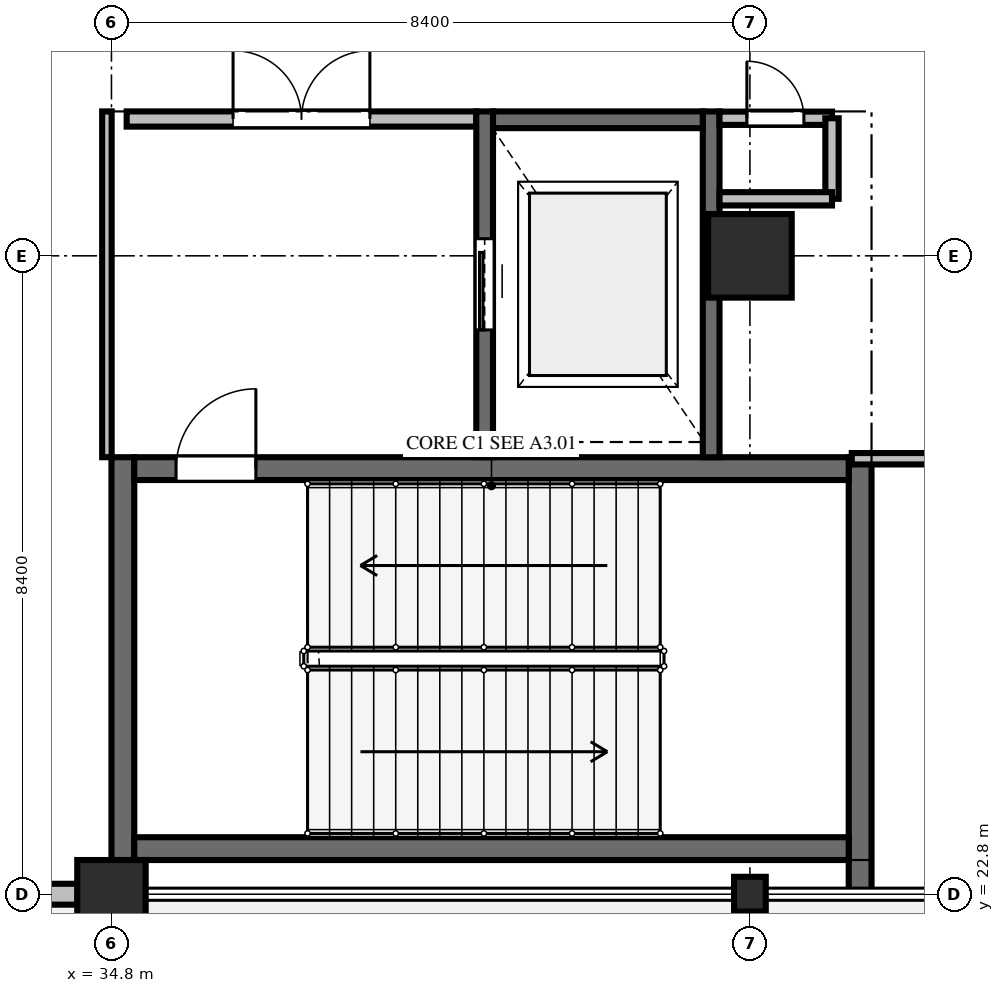
"""IFC4 building model, lengths in metres.
Left out: names, types, materials, properties, quantities, classifications, styles, units other than length and angle.
Written with IfcOpenShell. Run it as: python <this file> out.ifc"""

import sys

from ifc_helpers import new_model, si_unit, direction, frame, frame_2d, origin, origin_2d, place, context, subcontext, project, spatial, rectangle, hollow_rectangle, i_section, extrude, element, fill, save


model = new_model("IFC4")
c1 = context("Model", 3, precision=1e-05, world=origin(), true_north=direction((0.0, 1.0)))
c2 = subcontext(c1, "Body", "Model", "MODEL_VIEW")
j1 = project(units=[si_unit("LENGTHUNIT", "METRE"), si_unit("PLANEANGLEUNIT", "RADIAN")], contexts=[c1])
p1 = place(None, origin())
s1 = spatial("IfcSite", under=j1, at=p1, CompositionType="ELEMENT")
p2 = place(p1, origin())
s2 = spatial("IfcBuilding", under=s1, at=p2, CompositionType="ELEMENT")
p3 = place(p2, frame((0.0, 0.0, 10.8)))
s3 = spatial("IfcBuildingStorey", under=s2, at=p3, CompositionType="ELEMENT", Elevation=10.8)
p4 = place(p3, frame((34.8, 22.8, 0.0), z_axis=(0.0, 0.0, 1.0), x_axis=(1.0, 0.0, 0.0)))
e1 = element("IfcColumn", 1, at=p4, inside=s3, PredefinedType="COLUMN", context=c2, shape_type="SweptSolid", body=[
    extrude(hollow_rectangle(XDim=0.9, YDim=0.9, WallThickness=0.036, InnerFilletRadius=0.036, OuterFilletRadius=0.072, at=origin_2d()), origin(), (0.0, 0.0, 1.0), 6.0),
])
p5 = place(p3, frame((43.2, 22.8, 0.0), z_axis=(0.0, 0.0, 1.0), x_axis=(1.0, 0.0, 0.0)))
e2 = element("IfcColumn", 2, at=p5, inside=s3, PredefinedType="COLUMN", context=c2, shape_type="SweptSolid", body=[
    extrude(i_section(OverallWidth=0.417, OverallDepth=0.458, WebThickness=0.03, FlangeThickness=0.04, FilletRadius=0.022, at=origin_2d()), origin(), (0.0, 0.0, 1.0), 6.0),
])
p6 = place(p3, frame((43.2, 31.2, 0.0), z_axis=(0.0, 0.0, 1.0), x_axis=(1.0, 0.0, 0.0)))
e3 = element("IfcColumn", 3, at=p6, inside=s3, PredefinedType="COLUMN", context=c2, shape_type="SweptSolid", body=[
    extrude(rectangle(XDim=1.1, YDim=1.1, at=origin_2d()), origin(), (0.0, 0.0, 1.0), 6.0),
])
p7 = place(p3, frame((34.354, 22.8, 0.0), z_axis=(0.0, 0.0, 1.0), x_axis=(-1.0, 0.0, 0.0)))
e4 = element("IfcWall", 4, at=p7, inside=s3, PredefinedType="SOLIDWALL", context=c2, shape_type="SweptSolid", body=[
    extrude(rectangle(XDim=6.686, YDim=0.275, at=frame_2d((3.343, 0.0))), origin(), (0.0, 0.0, 1.0), 5.66),
])
p8 = place(p7, frame((2.543, 0.0, 0.0)))
e5 = element("IfcOpeningElement", 5, at=p8, cuts=e4, PredefinedType="OPENING", context=c2, shape_type="SweptSolid", body=[
    extrude(rectangle(XDim=1.6, YDim=2.2, at=frame_2d((0.8, 1.1))), frame((0.0, 0.147, 0.0), z_axis=(0.0, -1.0, 0.0), x_axis=(1.0, 0.0, 0.0)), (0.0, 0.0, 1.0), 0.295),
])
p9 = place(p3, frame((34.95, 23.25, 0.0), z_axis=(0.0, 0.0, 1.0), x_axis=(0.0, 1.0, 0.0)))
e6 = element("IfcWall", 6, at=p9, inside=s3, PredefinedType="SHEAR", context=c2, shape_type="SweptSolid", body=[
    extrude(rectangle(XDim=5.3, YDim=0.3, at=frame_2d((2.65, 0.0))), origin(), (0.0, 0.0, 1.0), 5.68),
])
p10 = place(p3, frame((44.65, 28.55, 0.0), z_axis=(0.0, 0.0, 1.0), x_axis=(0.0, -1.0, 0.0)))
e7 = element("IfcWall", 7, at=p10, inside=s3, PredefinedType="SHEAR", context=c2, shape_type="SweptSolid", body=[
    extrude(rectangle(XDim=5.75, YDim=0.3, at=frame_2d((2.875, 0.0))), origin(), (0.0, 0.0, 1.0), 5.68),
])
p11 = place(p3, frame((44.5, 23.4, 0.0), z_axis=(0.0, 0.0, 1.0), x_axis=(-1.0, 0.0, 0.0)))
e8 = element("IfcWall", 8, at=p11, inside=s3, PredefinedType="SHEAR", context=c2, shape_type="SweptSolid", body=[
    extrude(rectangle(XDim=9.4, YDim=0.3, at=frame_2d((4.7, 0.0))), origin(), (0.0, 0.0, 1.0), 5.68),
])
p12 = place(p3, frame((35.1, 28.4, 0.0), z_axis=(0.0, 0.0, 1.0), x_axis=(1.0, 0.0, 0.0)))
e9 = element("IfcWall", 9, at=p12, inside=s3, PredefinedType="SHEAR", context=c2, shape_type="SweptSolid", body=[
    extrude(rectangle(XDim=9.4, YDim=0.3, at=frame_2d((4.7, 0.0))), origin(), (0.0, 0.0, 1.0), 5.68),
])
p13 = place(p12, frame((0.55, 0.0, 0.0)))
e10 = element("IfcOpeningElement", 10, at=p13, cuts=e9, PredefinedType="OPENING", context=c2, shape_type="SweptSolid", body=[
    extrude(rectangle(XDim=1.05, YDim=2.2, at=frame_2d((0.525, 1.1))), frame((0.0, 0.16, 0.0), z_axis=(0.0, -1.0, 0.0), x_axis=(1.0, 0.0, 0.0)), (0.0, 0.0, 1.0), 0.32),
])
p14 = place(p3, frame((35.0, 33.0, 0.0), z_axis=(0.0, 0.0, 1.0), x_axis=(1.0, 0.0, 0.0)))
e11 = element("IfcWall", 11, at=p14, inside=s3, PredefinedType="SOLIDWALL", context=c2, shape_type="SweptSolid", body=[
    extrude(rectangle(XDim=4.6, YDim=0.2, at=frame_2d((2.3, 0.0))), origin(), (0.0, 0.0, 1.0), 5.65),
])
p15 = place(p14, frame((1.4, 0.0, 0.0)))
e12 = element("IfcOpeningElement", 12, at=p15, cuts=e11, PredefinedType="OPENING", context=c2, shape_type="SweptSolid", body=[
    extrude(rectangle(XDim=1.8, YDim=2.2, at=frame_2d((0.9, 1.1))), frame((0.0, 0.11, 0.0), z_axis=(0.0, -1.0, 0.0), x_axis=(1.0, 0.0, 0.0)), (0.0, 0.0, 1.0), 0.22),
])
p16 = place(p3, frame((39.71, 28.55, 0.0), z_axis=(0.0, 0.0, 1.0), x_axis=(0.0, 1.0, 0.0)))
e13 = element("IfcWall", 13, at=p16, inside=s3, PredefinedType="SOLIDWALL", context=c2, shape_type="SweptSolid", body=[
    extrude(rectangle(XDim=4.55, YDim=0.22, at=frame_2d((2.275, 0.0))), origin(), (0.0, 0.0, 1.0), 5.68),
])
p17 = place(p16, frame((1.675, 0.0, 0.0)))
e14 = element("IfcOpeningElement", 14, at=p17, cuts=e13, PredefinedType="OPENING", context=c2, shape_type="SweptSolid", body=[
    extrude(rectangle(XDim=1.2, YDim=2.2, at=frame_2d((0.6, 1.1))), frame((0.0, 0.12, 0.0), z_axis=(0.0, -1.0, 0.0), x_axis=(1.0, 0.0, 0.0)), (0.0, 0.0, 1.0), 0.24),
])
p18 = place(p3, frame((42.69, 28.55, 0.0), z_axis=(0.0, 0.0, 1.0), x_axis=(0.0, 1.0, 0.0)))
e15 = element("IfcWall", 15, at=p18, inside=s3, PredefinedType="SOLIDWALL", context=c2, shape_type="SweptSolid", body=[
    extrude(rectangle(XDim=4.55, YDim=0.22, at=frame_2d((2.275, 0.0))), origin(), (0.0, 0.0, 1.0), 5.68),
])
p19 = place(p3, frame((39.82, 32.99, 0.0), z_axis=(0.0, 0.0, 1.0), x_axis=(1.0, 0.0, 0.0)))
e16 = element("IfcWall", 16, at=p19, inside=s3, PredefinedType="SOLIDWALL", context=c2, shape_type="SweptSolid", body=[
    extrude(rectangle(XDim=2.76, YDim=0.22, at=frame_2d((1.38, 0.0))), origin(), (0.0, 0.0, 1.0), 5.68),
])
p20 = place(p3, frame((42.8, 33.01, 0.0), z_axis=(0.0, 0.0, 1.0), x_axis=(1.0, 0.0, 0.0)))
e17 = element("IfcWall", 17, at=p20, inside=s3, PredefinedType="PLUMBINGWALL", context=c2, shape_type="SweptSolid", body=[
    extrude(rectangle(XDim=1.48, YDim=0.175, at=frame_2d((0.74, 0.0))), origin(), (0.0, 0.0, 1.0), 5.65),
])
p21 = place(p20, frame((0.36, 0.0, 0.0)))
e18 = element("IfcOpeningElement", 18, at=p21, cuts=e17, PredefinedType="OPENING", context=c2, shape_type="SweptSolid", body=[
    extrude(rectangle(XDim=0.75, YDim=2.05, at=frame_2d((0.375, 1.025))), frame((0.0, 0.097, 0.0), z_axis=(0.0, -1.0, 0.0), x_axis=(1.0, 0.0, 0.0)), (0.0, 0.0, 1.0), 0.195),
])
p22 = place(p3, frame((44.28, 31.95, 0.0), z_axis=(0.0, 0.0, 1.0), x_axis=(0.0, 1.0, 0.0)))
e19 = element("IfcWall", 19, at=p22, inside=s3, PredefinedType="PLUMBINGWALL", context=c2, shape_type="SweptSolid", body=[
    extrude(rectangle(XDim=1.06, YDim=0.175, at=frame_2d((0.53, 0.0))), origin(), (0.0, 0.0, 1.0), 5.65),
])
p23 = place(p3, frame((42.8, 31.95, 0.0), z_axis=(0.0, 0.0, 1.0), x_axis=(1.0, 0.0, 0.0)))
e20 = element("IfcWall", 20, at=p23, inside=s3, PredefinedType="PLUMBINGWALL", context=c2, shape_type="SweptSolid", body=[
    extrude(rectangle(XDim=1.48, YDim=0.175, at=frame_2d((0.74, 0.0))), origin(), (0.0, 0.0, 1.0), 5.65),
])
p24 = place(p3, frame((44.54, 28.53, 0.0), z_axis=(0.0, 0.0, 1.0), x_axis=(1.0, 0.0, 0.0)))
e21 = element("IfcWall", 21, at=p24, inside=s3, PredefinedType="PARTITIONING", context=c2, shape_type="SweptSolid", body=[
    extrude(rectangle(XDim=15.46, YDim=0.15, at=frame_2d((7.73, 0.0))), origin(), (0.0, 0.0, 1.0), 4.858),
])
p25 = place(p24, frame((7.27, 0.0, 0.0)))
e22 = element("IfcOpeningElement", 22, at=p25, cuts=e21, PredefinedType="OPENING", context=c2, shape_type="SweptSolid", body=[
    extrude(rectangle(XDim=0.92, YDim=2.15, at=frame_2d((0.46, 1.075))), frame((0.0, 0.085, 0.0), z_axis=(0.0, -1.0, 0.0), x_axis=(1.0, 0.0, 0.0)), (0.0, 0.0, 1.0), 0.17),
])
p26 = place(p3, frame((34.74, 33.1, 0.0), z_axis=(0.0, 0.0, 1.0), x_axis=(0.0, -1.0, 0.0)))
e23 = element("IfcWall", 23, at=p26, inside=s3, PredefinedType="PARTITIONING", context=c2, shape_type="SweptSolid", body=[
    extrude(rectangle(XDim=4.55, YDim=0.125, at=frame_2d((2.275, 0.0))), origin(), (0.0, 0.0, 1.0), 5.65),
])
p27 = place(p13, origin())
e24 = element("IfcDoor", 24, at=p27, inside=s3, OperationType="SINGLE_SWING_RIGHT", PredefinedType="DOOR", context=c2, shape_type="SweptSolid", body=[
    extrude(rectangle(XDim=1.05, YDim=2.2, at=frame_2d((0.525, 1.1))), frame((0.0, 0.025, 0.0), z_axis=(0.0, -1.0, 0.0), x_axis=(1.0, 0.0, 0.0)), (0.0, 0.0, 1.0), 0.05),
])
fill(e10, e24)
p28 = place(p15, origin())
e25 = element("IfcDoor", 25, at=p28, inside=s3, OperationType="DOUBLE_DOOR_SINGLE_SWING", PredefinedType="DOOR", context=c2, shape_type="SweptSolid", body=[
    extrude(rectangle(XDim=1.8, YDim=2.2, at=frame_2d((0.9, 1.1))), frame((0.0, 0.025, 0.0), z_axis=(0.0, -1.0, 0.0), x_axis=(1.0, 0.0, 0.0)), (0.0, 0.0, 1.0), 0.05),
])
fill(e12, e25)
p29 = place(p17, origin())
e26 = element("IfcDoor", 26, at=p29, inside=s3, OperationType="SLIDING_TO_LEFT", PredefinedType="DOOR", context=c2, shape_type="SweptSolid", body=[
    extrude(rectangle(XDim=1.2, YDim=2.2, at=frame_2d((0.6, 1.1))), frame((0.0, 0.025, 0.0), z_axis=(0.0, -1.0, 0.0), x_axis=(1.0, 0.0, 0.0)), (0.0, 0.0, 1.0), 0.05),
])
fill(e14, e26)
p30 = place(p21, origin())
e27 = element("IfcDoor", 27, at=p30, inside=s3, OperationType="SINGLE_SWING_LEFT", PredefinedType="DOOR", context=c2, shape_type="SweptSolid", body=[
    extrude(rectangle(XDim=0.75, YDim=2.05, at=frame_2d((0.375, 1.025))), frame((0.0, 0.025, 0.0), z_axis=(0.0, -1.0, 0.0), x_axis=(1.0, 0.0, 0.0)), (0.0, 0.0, 1.0), 0.05),
])
fill(e18, e27)
save(model, sys.argv[1])
